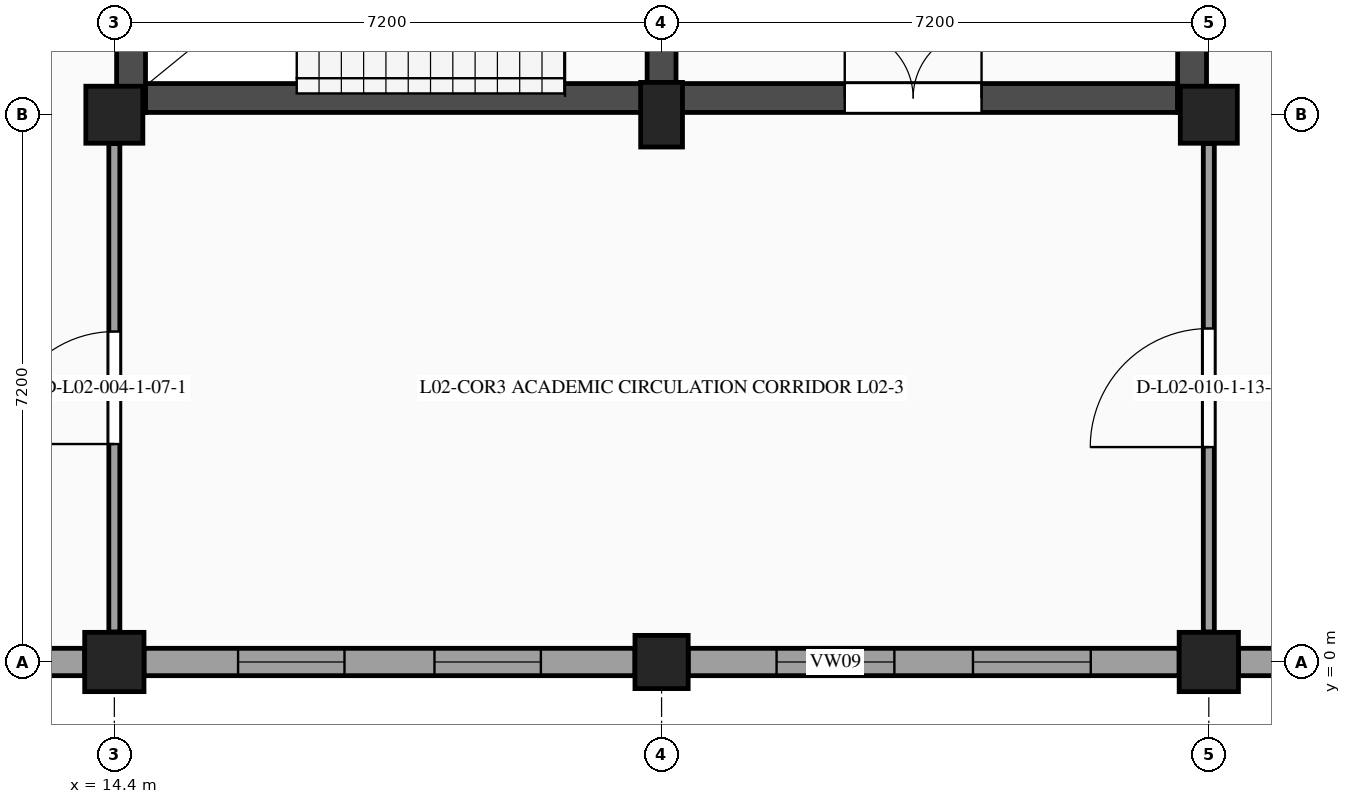
"""IFC4 building model, lengths in metres.
Left out: names, types, materials, properties, quantities, classifications, styles, units other than length and angle.
Written with IfcOpenShell. Run it as: python <this file> out.ifc"""

import sys

from ifc_helpers import new_model, si_unit, direction, frame, frame_2d, origin, origin_2d, place, context, subcontext, project, spatial, rectangle, extrude, element, fill, save


model = new_model("IFC4")
c1 = context("Model", 3, precision=1e-05, world=origin(), true_north=direction((0.0, 1.0)))
c2 = subcontext(c1, "Body", "Model", "MODEL_VIEW")
j1 = project(units=[si_unit("LENGTHUNIT", "METRE"), si_unit("PLANEANGLEUNIT", "RADIAN")], contexts=[c1])
p1 = place(None, origin())
s1 = spatial("IfcSite", under=j1, at=p1, CompositionType="ELEMENT")
p2 = place(p1, origin())
s2 = spatial("IfcBuilding", under=s1, at=p2, CompositionType="ELEMENT")
p3 = place(p2, frame((0.0, 0.0, 9.9)))
s3 = spatial("IfcBuildingStorey", under=s2, at=p3, CompositionType="ELEMENT", Elevation=9.9)
p4 = place(p3, frame((14.4, 0.0, 0.0), z_axis=(0.0, 0.0, 1.0), x_axis=(1.0, 0.0, 0.0)))
e1 = element("IfcColumn", 1, at=p4, inside=s3, PredefinedType="COLUMN", context=c2, shape_type="SweptSolid", body=[
    extrude(rectangle(XDim=0.78, YDim=0.78, at=origin_2d()), origin(), (0.0, 0.0, 1.0), 4.5),
])
p5 = place(p3, frame((14.4, 7.2, 0.0), z_axis=(0.0, 0.0, 1.0), x_axis=(1.0, 0.0, 0.0)))
e2 = element("IfcColumn", 2, at=p5, inside=s3, PredefinedType="COLUMN", context=c2, shape_type="SweptSolid", body=[
    extrude(rectangle(XDim=0.75, YDim=0.75, at=origin_2d()), origin(), (0.0, 0.0, 1.0), 4.5),
])
p6 = place(p3, frame((21.6, 0.0, 0.0), z_axis=(0.0, 0.0, 1.0), x_axis=(1.0, 0.0, 0.0)))
e3 = element("IfcColumn", 3, at=p6, inside=s3, PredefinedType="COLUMN", context=c2, shape_type="SweptSolid", body=[
    extrude(rectangle(XDim=0.7, YDim=0.7, at=origin_2d()), origin(), (0.0, 0.0, 1.0), 4.5),
])
p7 = place(p3, frame((21.6, 7.2, 0.0), z_axis=(0.0, 0.0, 1.0), x_axis=(1.0, 0.0, 0.0)))
e4 = element("IfcColumn", 4, at=p7, inside=s3, PredefinedType="COLUMN", context=c2, shape_type="SweptSolid", body=[
    extrude(rectangle(XDim=0.55, YDim=0.85, at=origin_2d()), origin(), (0.0, 0.0, 1.0), 4.5),
])
p8 = place(p3, frame((28.8, 0.0, 0.0), z_axis=(0.0, 0.0, 1.0), x_axis=(1.0, 0.0, 0.0)))
e5 = element("IfcColumn", 5, at=p8, inside=s3, PredefinedType="COLUMN", context=c2, shape_type="SweptSolid", body=[
    extrude(rectangle(XDim=0.78, YDim=0.78, at=origin_2d()), origin(), (0.0, 0.0, 1.0), 4.5),
])
p9 = place(p3, frame((28.8, 7.2, 0.0), z_axis=(0.0, 0.0, 1.0), x_axis=(1.0, 0.0, 0.0)))
e6 = element("IfcColumn", 6, at=p9, inside=s3, PredefinedType="COLUMN", context=c2, shape_type="SweptSolid", body=[
    extrude(rectangle(XDim=0.75, YDim=0.75, at=origin_2d()), origin(), (0.0, 0.0, 1.0), 4.5),
])
p10 = place(p3, frame((35.65, 0.0, 0.0), z_axis=(0.0, 0.0, 1.0), x_axis=(-1.0, 0.0, 0.0)))
e7 = element("IfcWall", 7, at=p10, inside=s3, PredefinedType="STANDARD", context=c2, shape_type="SweptSolid", body=[
    extrude(rectangle(XDim=6.46, YDim=0.36, at=frame_2d((3.23, 0.0))), origin(), (0.0, 0.0, 1.0), 3.47),
])
p11 = place(p10, frame((1.063, 0.0, 1.15)))
e8 = element("IfcOpeningElement", 8, at=p11, cuts=e7, PredefinedType="OPENING", context=c2, shape_type="SweptSolid", body=[
    extrude(rectangle(XDim=1.75, YDim=1.4, at=frame_2d((0.875, 0.7))), frame((0.0, 0.19, 0.0), z_axis=(0.0, -1.0, 0.0), x_axis=(1.0, 0.0, 0.0)), (0.0, 0.0, 1.0), 0.38),
])
p12 = place(p10, frame((3.647, 0.0, 1.15)))
e9 = element("IfcOpeningElement", 9, at=p12, cuts=e7, PredefinedType="OPENING", context=c2, shape_type="SweptSolid", body=[
    extrude(rectangle(XDim=1.75, YDim=1.4, at=frame_2d((0.875, 0.7))), frame((0.0, 0.19, 0.0), z_axis=(0.0, -1.0, 0.0), x_axis=(1.0, 0.0, 0.0)), (0.0, 0.0, 1.0), 0.38),
])
p13 = place(p3, frame((28.41, 0.0, 0.0), z_axis=(0.0, 0.0, 1.0), x_axis=(-1.0, 0.0, 0.0)))
e10 = element("IfcWall", 10, at=p13, inside=s3, PredefinedType="STANDARD", context=c2, shape_type="SweptSolid", body=[
    extrude(rectangle(XDim=6.46, YDim=0.36, at=frame_2d((3.23, 0.0))), origin(), (0.0, 0.0, 1.0), 3.47),
])
p14 = place(p13, frame((1.163, 0.0, 1.15)))
e11 = element("IfcOpeningElement", 11, at=p14, cuts=e10, PredefinedType="OPENING", context=c2, shape_type="SweptSolid", body=[
    extrude(rectangle(XDim=1.55, YDim=1.35, at=frame_2d((0.775, 0.675))), frame((0.0, 0.19, 0.0), z_axis=(0.0, -1.0, 0.0), x_axis=(1.0, 0.0, 0.0)), (0.0, 0.0, 1.0), 0.38),
])
p15 = place(p13, frame((3.747, 0.0, 1.15)))
e12 = element("IfcOpeningElement", 12, at=p15, cuts=e10, PredefinedType="OPENING", context=c2, shape_type="SweptSolid", body=[
    extrude(rectangle(XDim=1.55, YDim=1.35, at=frame_2d((0.775, 0.675))), frame((0.0, 0.19, 0.0), z_axis=(0.0, -1.0, 0.0), x_axis=(1.0, 0.0, 0.0)), (0.0, 0.0, 1.0), 0.38),
])
p16 = place(p3, frame((21.25, 0.0, 0.0), z_axis=(0.0, 0.0, 1.0), x_axis=(-1.0, 0.0, 0.0)))
e13 = element("IfcWall", 13, at=p16, inside=s3, PredefinedType="STANDARD", context=c2, shape_type="SweptSolid", body=[
    extrude(rectangle(XDim=6.46, YDim=0.36, at=frame_2d((3.23, 0.0))), origin(), (0.0, 0.0, 1.0), 3.47),
])
p17 = place(p16, frame((1.238, 0.0, 1.15)))
e14 = element("IfcOpeningElement", 14, at=p17, cuts=e13, PredefinedType="OPENING", context=c2, shape_type="SweptSolid", body=[
    extrude(rectangle(XDim=1.4, YDim=1.3, at=frame_2d((0.7, 0.65))), frame((0.0, 0.19, 0.0), z_axis=(0.0, -1.0, 0.0), x_axis=(1.0, 0.0, 0.0)), (0.0, 0.0, 1.0), 0.38),
])
p18 = place(p16, frame((3.822, 0.0, 1.15)))
e15 = element("IfcOpeningElement", 15, at=p18, cuts=e13, PredefinedType="OPENING", context=c2, shape_type="SweptSolid", body=[
    extrude(rectangle(XDim=1.4, YDim=1.3, at=frame_2d((0.7, 0.65))), frame((0.0, 0.19, 0.0), z_axis=(0.0, -1.0, 0.0), x_axis=(1.0, 0.0, 0.0)), (0.0, 0.0, 1.0), 0.38),
])
p19 = place(p3, frame((14.01, 0.0, 0.0), z_axis=(0.0, 0.0, 1.0), x_axis=(-1.0, 0.0, 0.0)))
e16 = element("IfcWall", 16, at=p19, inside=s3, PredefinedType="STANDARD", context=c2, shape_type="SweptSolid", body=[
    extrude(rectangle(XDim=6.46, YDim=0.36, at=frame_2d((3.23, 0.0))), origin(), (0.0, 0.0, 1.0), 3.47),
])
p20 = place(p19, frame((1.313, 0.0, 1.15)))
e17 = element("IfcOpeningElement", 17, at=p20, cuts=e16, PredefinedType="OPENING", context=c2, shape_type="SweptSolid", body=[
    extrude(rectangle(XDim=1.25, YDim=1.25, at=frame_2d((0.625, 0.625))), frame((0.0, 0.19, 0.0), z_axis=(0.0, -1.0, 0.0), x_axis=(1.0, 0.0, 0.0)), (0.0, 0.0, 1.0), 0.38),
])
p21 = place(p19, frame((3.897, 0.0, 1.15)))
e18 = element("IfcOpeningElement", 18, at=p21, cuts=e16, PredefinedType="OPENING", context=c2, shape_type="SweptSolid", body=[
    extrude(rectangle(XDim=1.25, YDim=1.25, at=frame_2d((0.625, 0.625))), frame((0.0, 0.19, 0.0), z_axis=(0.0, -1.0, 0.0), x_axis=(1.0, 0.0, 0.0)), (0.0, 0.0, 1.0), 0.38),
])
p22 = place(p3, frame((14.81, 7.42, 0.0), z_axis=(0.0, 0.0, 1.0), x_axis=(1.0, 0.0, 0.0)))
e19 = element("IfcWall", 19, at=p22, inside=s3, PredefinedType="SHEAR", context=c2, shape_type="SweptSolid", body=[
    extrude(rectangle(XDim=6.6, YDim=0.38, at=frame_2d((3.3, 0.0))), origin(), (0.0, 0.0, 1.0), 4.225),
])
p23 = place(p3, frame((14.62, 14.37, 0.0), z_axis=(0.0, 0.0, 1.0), x_axis=(0.0, -1.0, 0.0)))
e20 = element("IfcWall", 20, at=p23, inside=s3, PredefinedType="SHEAR", context=c2, shape_type="SweptSolid", body=[
    extrude(rectangle(XDim=7.14, YDim=0.38, at=frame_2d((3.57, 0.0))), origin(), (0.0, 0.0, 1.0), 4.225),
])
p24 = place(p3, frame((21.6, 7.23, 0.0), z_axis=(0.0, 0.0, 1.0), x_axis=(0.0, 1.0, 0.0)))
e21 = element("IfcWall", 21, at=p24, inside=s3, PredefinedType="SHEAR", context=c2, shape_type="SweptSolid", body=[
    extrude(rectangle(XDim=7.14, YDim=0.38, at=frame_2d((3.57, 0.0))), origin(), (0.0, 0.0, 1.0), 4.225),
])
p25 = place(p24, frame((1.4, 0.0, 0.0)))
e22 = element("IfcOpeningElement", 22, at=p25, cuts=e21, PredefinedType="OPENING", context=c2, shape_type="SweptSolid", body=[
    extrude(rectangle(XDim=1.8, YDim=2.2, at=frame_2d((0.9, 1.1))), frame((0.0, 0.2, 0.0), z_axis=(0.0, -1.0, 0.0), x_axis=(1.0, 0.0, 0.0)), (0.0, 0.0, 1.0), 0.4),
])
p26 = place(p3, frame((21.79, 7.42, 0.0), z_axis=(0.0, 0.0, 1.0), x_axis=(1.0, 0.0, 0.0)))
e23 = element("IfcWall", 23, at=p26, inside=s3, PredefinedType="SHEAR", context=c2, shape_type="SweptSolid", body=[
    extrude(rectangle(XDim=6.6, YDim=0.38, at=frame_2d((3.3, 0.0))), origin(), (0.0, 0.0, 1.0), 4.225),
])
p27 = place(p26, frame((2.22, 0.0, 0.0)))
e24 = element("IfcOpeningElement", 24, at=p27, cuts=e23, PredefinedType="OPENING", context=c2, shape_type="SweptSolid", body=[
    extrude(rectangle(XDim=1.8, YDim=2.2, at=frame_2d((0.9, 1.1))), frame((0.0, 0.2, 0.0), z_axis=(0.0, -1.0, 0.0), x_axis=(1.0, 0.0, 0.0)), (0.0, 0.0, 1.0), 0.4),
])
p28 = place(p3, frame((28.58, 7.23, 0.0), z_axis=(0.0, 0.0, 1.0), x_axis=(0.0, 1.0, 0.0)))
e25 = element("IfcWall", 25, at=p28, inside=s3, PredefinedType="SHEAR", context=c2, shape_type="SweptSolid", body=[
    extrude(rectangle(XDim=7.14, YDim=0.38, at=frame_2d((3.57, 0.0))), origin(), (0.0, 0.0, 1.0), 4.225),
])
p29 = place(p3, frame((14.4, 0.395, 0.0), z_axis=(0.0, 0.0, 1.0), x_axis=(0.0, 1.0, 0.0)))
e26 = element("IfcWall", 26, at=p29, inside=s3, PredefinedType="PARTITIONING", context=c2, shape_type="SweptSolid", body=[
    extrude(rectangle(XDim=6.425, YDim=0.145, at=frame_2d((3.212, 0.0))), origin(), (0.0, 0.0, 1.0), 3.54),
])
p30 = place(p29, frame((2.472, 0.0, 0.0)))
e27 = element("IfcOpeningElement", 27, at=p30, cuts=e26, PredefinedType="OPENING", context=c2, shape_type="SweptSolid", body=[
    extrude(rectangle(XDim=1.48, YDim=2.28, at=frame_2d((0.74, 1.14))), frame((0.0, 0.083, 0.0), z_axis=(0.0, -1.0, 0.0), x_axis=(1.0, 0.0, 0.0)), (0.0, 0.0, 1.0), 0.165),
])
p31 = place(p3, frame((28.8, 0.395, 0.0), z_axis=(0.0, 0.0, 1.0), x_axis=(0.0, 1.0, 0.0)))
e28 = element("IfcWall", 28, at=p31, inside=s3, PredefinedType="PARTITIONING", context=c2, shape_type="SweptSolid", body=[
    extrude(rectangle(XDim=6.425, YDim=0.145, at=frame_2d((3.212, 0.0))), origin(), (0.0, 0.0, 1.0), 3.54),
])
p32 = place(p31, frame((2.433, 0.0, 0.0)))
e29 = element("IfcOpeningElement", 29, at=p32, cuts=e28, PredefinedType="OPENING", context=c2, shape_type="SweptSolid", body=[
    extrude(rectangle(XDim=1.56, YDim=2.25, at=frame_2d((0.78, 1.125))), frame((0.0, 0.083, 0.0), z_axis=(0.0, -1.0, 0.0), x_axis=(1.0, 0.0, 0.0)), (0.0, 0.0, 1.0), 0.165),
])
p33 = place(p14, origin())
e30 = element("IfcWindow", 30, at=p33, inside=s3, PartitioningType="SINGLE_PANEL", PredefinedType="WINDOW", context=c2, shape_type="SweptSolid", body=[
    extrude(rectangle(XDim=1.55, YDim=1.35, at=frame_2d((0.775, 0.675))), frame((0.0, -0.08, 0.0), z_axis=(0.0, -1.0, 0.0), x_axis=(1.0, 0.0, 0.0)), (0.0, 0.0, 1.0), 0.06),
])
fill(e11, e30)
p34 = place(p15, origin())
e31 = element("IfcWindow", 31, at=p34, inside=s3, PartitioningType="SINGLE_PANEL", PredefinedType="WINDOW", context=c2, shape_type="SweptSolid", body=[
    extrude(rectangle(XDim=1.55, YDim=1.35, at=frame_2d((0.775, 0.675))), frame((0.0, -0.08, 0.0), z_axis=(0.0, -1.0, 0.0), x_axis=(1.0, 0.0, 0.0)), (0.0, 0.0, 1.0), 0.06),
])
fill(e12, e31)
p35 = place(p17, origin())
e32 = element("IfcWindow", 32, at=p35, inside=s3, PartitioningType="SINGLE_PANEL", PredefinedType="WINDOW", context=c2, shape_type="SweptSolid", body=[
    extrude(rectangle(XDim=1.4, YDim=1.3, at=frame_2d((0.7, 0.65))), frame((0.0, -0.08, 0.0), z_axis=(0.0, -1.0, 0.0), x_axis=(1.0, 0.0, 0.0)), (0.0, 0.0, 1.0), 0.06),
])
fill(e14, e32)
p36 = place(p18, origin())
e33 = element("IfcWindow", 33, at=p36, inside=s3, PartitioningType="SINGLE_PANEL", PredefinedType="WINDOW", context=c2, shape_type="SweptSolid", body=[
    extrude(rectangle(XDim=1.4, YDim=1.3, at=frame_2d((0.7, 0.65))), frame((0.0, -0.08, 0.0), z_axis=(0.0, -1.0, 0.0), x_axis=(1.0, 0.0, 0.0)), (0.0, 0.0, 1.0), 0.06),
])
fill(e15, e33)
p37 = place(p27, origin())
e34 = element("IfcDoor", 34, at=p37, inside=s3, OperationType="DOUBLE_DOOR_SINGLE_SWING", PredefinedType="DOOR", context=c2, shape_type="SweptSolid", body=[
    extrude(rectangle(XDim=1.8, YDim=2.2, at=frame_2d((0.9, 1.1))), frame((0.0, 0.025, 0.0), z_axis=(0.0, -1.0, 0.0), x_axis=(1.0, 0.0, 0.0)), (0.0, 0.0, 1.0), 0.05),
])
fill(e24, e34)
p38 = place(p30, origin())
e35 = element("IfcDoor", 35, at=p38, inside=s3, OperationType="SINGLE_SWING_LEFT", PredefinedType="DOOR", context=c2, shape_type="SweptSolid", body=[
    extrude(rectangle(XDim=1.48, YDim=2.28, at=frame_2d((0.74, 1.14))), frame((0.0, 0.025, 0.0), z_axis=(0.0, -1.0, 0.0), x_axis=(1.0, 0.0, 0.0)), (0.0, 0.0, 1.0), 0.05),
])
fill(e27, e35)
p39 = place(p32, origin())
e36 = element("IfcDoor", 36, at=p39, inside=s3, OperationType="SINGLE_SWING_LEFT", PredefinedType="DOOR", context=c2, shape_type="SweptSolid", body=[
    extrude(rectangle(XDim=1.56, YDim=2.25, at=frame_2d((0.78, 1.125))), frame((0.0, 0.025, 0.0), z_axis=(0.0, -1.0, 0.0), x_axis=(1.0, 0.0, 0.0)), (0.0, 0.0, 1.0), 0.05),
])
fill(e29, e36)
save(model, sys.argv[1])
